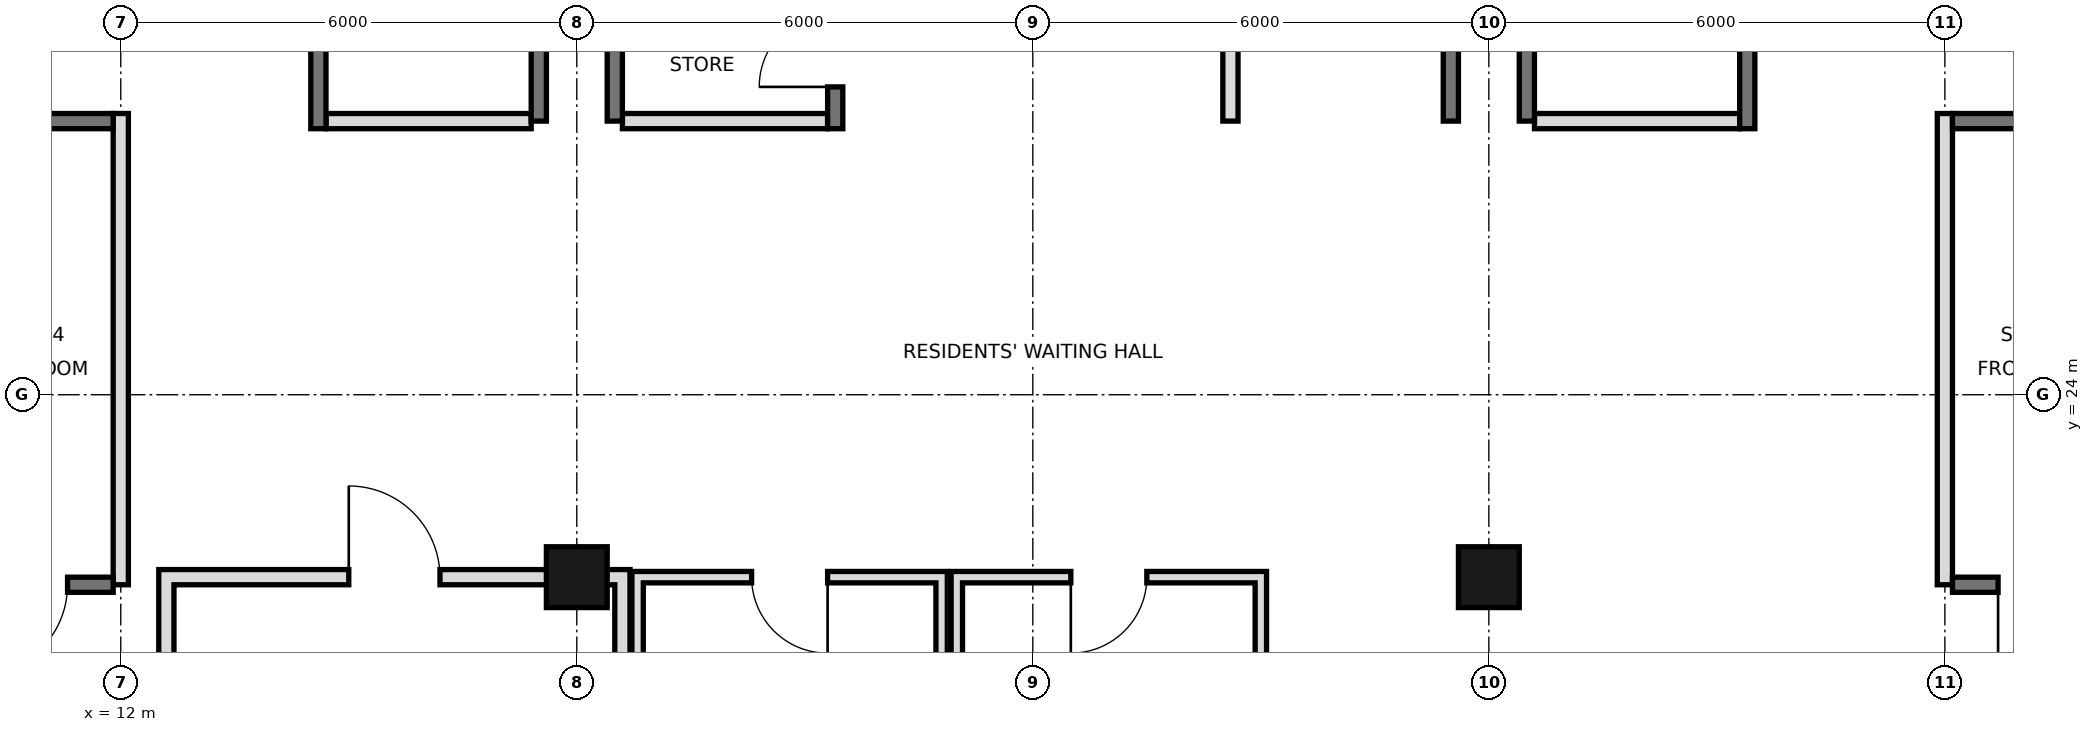
"""IFC4 building model, lengths in metres.
Left out: names, types, materials, properties, quantities, classifications, styles, units other than length and angle.
Written with IfcOpenShell. Run it as: python <this file> out.ifc"""

import sys

from ifc_helpers import new_model, si_unit, direction, frame, frame_2d, origin, origin_2d, place, context, subcontext, project, spatial, rectangle, hollow_rectangle, extrude, element, fill, save


model = new_model("IFC4")
c1 = context("Model", 3, precision=1e-05, world=origin(), true_north=direction((0.0, 1.0)))
c2 = subcontext(c1, "Body", "Model", "MODEL_VIEW")
j1 = project(units=[si_unit("LENGTHUNIT", "METRE"), si_unit("PLANEANGLEUNIT", "RADIAN")], contexts=[c1])
p1 = place(None, origin())
s1 = spatial("IfcSite", under=j1, at=p1, CompositionType="ELEMENT")
p2 = place(p1, origin())
s2 = spatial("IfcBuilding", under=s1, at=p2, CompositionType="ELEMENT")
p3 = place(p2, frame((0.0, 0.0, 341.8)))
s3 = spatial("IfcBuildingStorey", under=s2, at=p3, CompositionType="ELEMENT", Elevation=341.8)
for number, where, z_axis, x_axis in (
    (1, (18.0, 21.6, 0.0), (0.0, 0.0, 1.0), (1.0, 0.0, 0.0)),
    (2, (30.0, 21.6, 0.0), (0.0, 0.0, 1.0), (1.0, 0.0, 0.0)),
):
    element("IfcColumn", number, at=place(p3, frame(where, z_axis=z_axis, x_axis=x_axis)), inside=s3, PredefinedType="COLUMN", context=c2, shape_type="SweptSolid", body=[
        extrude(hollow_rectangle(XDim=0.8, YDim=0.8, WallThickness=0.025, at=origin_2d()), origin(), (0.0, 0.0, 1.0), 4.0),
    ])
for number, where, z_axis, x_axis in (
    (3, (12.6, 17.5, 0.0), (0.0, 0.0, 1.0), (0.0, 1.0, 0.0)),
    (4, (18.6, 17.5, 0.0), (0.0, 0.0, 1.0), (0.0, 1.0, 0.0)),
):
    element("IfcWall", number, at=place(p3, frame(where, z_axis=z_axis, x_axis=x_axis)), inside=s3, PredefinedType="SOLIDWALL", context=c2, shape_type="SweptSolid", body=[
        extrude(rectangle(XDim=4.2, YDim=0.2, at=frame_2d((2.1, 0.0))), origin(), (0.0, 0.0, 1.0), 3.05),
    ])
for number, where, z_axis, x_axis in (
    (5, (18.8, 17.525, 0.0), (0.0, 0.0, 1.0), (0.0, 1.0, 0.0)),
    (6, (22.8, 17.525, 0.0), (0.0, 0.0, 1.0), (0.0, 1.0, 0.0)),
    (7, (23.0, 17.525, 0.0), (0.0, 0.0, 1.0), (0.0, 1.0, 0.0)),
    (8, (27.0, 17.525, 0.0), (0.0, 0.0, 1.0), (0.0, 1.0, 0.0)),
):
    element("IfcWall", number, at=place(p3, frame(where, z_axis=z_axis, x_axis=x_axis)), inside=s3, PredefinedType="PARTITIONING", context=c2, shape_type="SweptSolid", body=[
        extrude(rectangle(XDim=4.15, YDim=0.15, at=frame_2d((2.075, 0.0))), origin(), (0.0, 0.0, 1.0), 3.75),
    ])
p4 = place(p3, frame((12.7, 21.6, 0.0), z_axis=(0.0, 0.0, 1.0), x_axis=(1.0, 0.0, 0.0)))
e9 = element("IfcWall", 9, at=p4, inside=s3, PredefinedType="SOLIDWALL", context=c2, shape_type="SweptSolid", body=[
    extrude(rectangle(XDim=5.8, YDim=0.2, at=frame_2d((2.9, 0.0))), origin(), (0.0, 0.0, 1.0), 3.75),
])
p5 = place(p4, frame((2.3, 0.0, 0.0)))
e10 = element("IfcOpeningElement", 10, at=p5, cuts=e9, PredefinedType="OPENING", context=c2, shape_type="SweptSolid", body=[
    extrude(rectangle(XDim=1.2, YDim=2.4, at=frame_2d((0.6, 1.2))), frame((0.0, 0.11, 0.0), z_axis=(0.0, -1.0, 0.0), x_axis=(1.0, 0.0, 0.0)), (0.0, 0.0, 1.0), 0.22),
])
p6 = place(p3, frame((18.875, 21.6, 0.0), z_axis=(0.0, 0.0, 1.0), x_axis=(1.0, 0.0, 0.0)))
e11 = element("IfcWall", 11, at=p6, inside=s3, PredefinedType="PARTITIONING", context=c2, shape_type="SweptSolid", body=[
    extrude(rectangle(XDim=3.85, YDim=0.15, at=frame_2d((1.925, 0.0))), origin(), (0.0, 0.0, 1.0), 3.75),
])
p7 = place(p6, frame((1.425, 0.0, 0.0)))
e12 = element("IfcOpeningElement", 12, at=p7, cuts=e11, PredefinedType="OPENING", context=c2, shape_type="SweptSolid", body=[
    extrude(rectangle(XDim=1.0, YDim=2.4, at=frame_2d((0.5, 1.2))), frame((0.0, 0.085, 0.0), z_axis=(0.0, -1.0, 0.0), x_axis=(1.0, 0.0, 0.0)), (0.0, 0.0, 1.0), 0.17),
])
p8 = place(p3, frame((23.075, 21.6, 0.0), z_axis=(0.0, 0.0, 1.0), x_axis=(1.0, 0.0, 0.0)))
e13 = element("IfcWall", 13, at=p8, inside=s3, PredefinedType="PARTITIONING", context=c2, shape_type="SweptSolid", body=[
    extrude(rectangle(XDim=3.85, YDim=0.15, at=frame_2d((1.925, 0.0))), origin(), (0.0, 0.0, 1.0), 3.75),
])
p9 = place(p8, frame((1.425, 0.0, 0.0)))
e14 = element("IfcOpeningElement", 14, at=p9, cuts=e13, PredefinedType="OPENING", context=c2, shape_type="SweptSolid", body=[
    extrude(rectangle(XDim=1.0, YDim=2.4, at=frame_2d((0.5, 1.2))), frame((0.0, 0.085, 0.0), z_axis=(0.0, -1.0, 0.0), x_axis=(1.0, 0.0, 0.0)), (0.0, 0.0, 1.0), 0.17),
])
for number, where, z_axis, x_axis in (
    (15, (17.5, 27.6, 0.0), (0.0, 0.0, 1.0), (0.0, 1.0, 0.0)),
    (16, (18.5, 27.6, 0.0), (0.0, 0.0, 1.0), (0.0, 1.0, 0.0)),
    (17, (29.5, 27.6, 0.0), (0.0, 0.0, 1.0), (0.0, 1.0, 0.0)),
    (18, (30.5, 27.6, 0.0), (0.0, 0.0, 1.0), (0.0, 1.0, 0.0)),
):
    element("IfcWall", number, at=place(p3, frame(where, z_axis=z_axis, x_axis=x_axis)), inside=s3, PredefinedType="SOLIDWALL", context=c2, shape_type="SweptSolid", body=[
        extrude(rectangle(XDim=17.5, YDim=0.2, at=frame_2d((8.75, 0.0))), origin(), (0.0, 0.0, 1.0), 3.75),
    ])
p10 = place(p3, frame((12.0, 21.5, 0.0), z_axis=(0.0, 0.0, 1.0), x_axis=(0.0, 1.0, 0.0)))
e19 = element("IfcWall", 19, at=p10, inside=s3, PredefinedType="PARTITIONING", context=c2, shape_type="SweptSolid", body=[
    extrude(rectangle(XDim=6.2, YDim=0.2, at=frame_2d((3.1, 0.0))), origin(), (0.0, 0.0, 1.0), 3.75),
])
p11 = place(p3, frame((14.6, 27.5, 0.0), z_axis=(0.0, 0.0, 1.0), x_axis=(0.0, 1.0, 0.0)))
e20 = element("IfcWall", 20, at=p11, inside=s3, PredefinedType="SOLIDWALL", context=c2, shape_type="SweptSolid", body=[
    extrude(rectangle(XDim=17.5, YDim=0.2, at=frame_2d((8.75, 0.0))), origin(), (0.0, 0.0, 1.0), 3.75),
])
p12 = place(p11, frame((15.4, 0.0, 0.0)))
e21 = element("IfcOpeningElement", 21, at=p12, cuts=e20, PredefinedType="OPENING", context=c2, shape_type="SweptSolid", body=[
    extrude(rectangle(XDim=1.1, YDim=2.1, at=frame_2d((0.55, 1.05))), frame((0.0, 0.11, 0.0), z_axis=(0.0, -1.0, 0.0), x_axis=(1.0, 0.0, 0.0)), (0.0, 0.0, 1.0), 0.22),
])
p13 = place(p11, frame((2.7, 0.0, 0.0)))
e22 = element("IfcOpeningElement", 22, at=p13, cuts=e20, PredefinedType="OPENING", context=c2, shape_type="SweptSolid", body=[
    extrude(rectangle(XDim=1.0, YDim=2.1, at=frame_2d((0.5, 1.05))), frame((0.0, 0.11, 0.0), z_axis=(0.0, -1.0, 0.0), x_axis=(1.0, 0.0, 0.0)), (0.0, 0.0, 1.0), 0.22),
])
p14 = place(p3, frame((21.4, 27.5, 0.0), z_axis=(0.0, 0.0, 1.0), x_axis=(0.0, 1.0, 0.0)))
e23 = element("IfcWall", 23, at=p14, inside=s3, PredefinedType="SOLIDWALL", context=c2, shape_type="SweptSolid", body=[
    extrude(rectangle(XDim=17.5, YDim=0.2, at=frame_2d((8.75, 0.0))), origin(), (0.0, 0.0, 1.0), 3.75),
])
p15 = place(p14, frame((0.55, 0.0, 0.0)))
e24 = element("IfcOpeningElement", 24, at=p15, cuts=e23, PredefinedType="OPENING", context=c2, shape_type="SweptSolid", body=[
    extrude(rectangle(XDim=1.0, YDim=2.1, at=frame_2d((0.5, 1.05))), frame((0.0, 0.11, 0.0), z_axis=(0.0, -1.0, 0.0), x_axis=(1.0, 0.0, 0.0)), (0.0, 0.0, 1.0), 0.22),
])
p16 = place(p14, frame((3.65, 0.0, 0.0)))
e25 = element("IfcOpeningElement", 25, at=p16, cuts=e23, PredefinedType="OPENING", context=c2, shape_type="SweptSolid", body=[
    extrude(rectangle(XDim=1.0, YDim=2.1, at=frame_2d((0.5, 1.05))), frame((0.0, 0.11, 0.0), z_axis=(0.0, -1.0, 0.0), x_axis=(1.0, 0.0, 0.0)), (0.0, 0.0, 1.0), 0.22),
])
p17 = place(p14, frame((9.8, 0.0, 0.0)))
e26 = element("IfcOpeningElement", 26, at=p17, cuts=e23, PredefinedType="OPENING", context=c2, shape_type="SweptSolid", body=[
    extrude(rectangle(XDim=1.0, YDim=2.1, at=frame_2d((0.5, 1.05))), frame((0.0, 0.11, 0.0), z_axis=(0.0, -1.0, 0.0), x_axis=(1.0, 0.0, 0.0)), (0.0, 0.0, 1.0), 0.22),
])
p18 = place(p3, frame((26.6, 27.6, 0.0), z_axis=(0.0, 0.0, 1.0), x_axis=(0.0, 1.0, 0.0)))
e27 = element("IfcWall", 27, at=p18, inside=s3, PredefinedType="PARTITIONING", context=c2, shape_type="SweptSolid", body=[
    extrude(rectangle(XDim=17.4, YDim=0.2, at=frame_2d((8.7, 0.0))), origin(), (0.0, 0.0, 1.0), 3.75),
])
p19 = place(p18, frame((10.25, 0.0, 0.0)))
e28 = element("IfcOpeningElement", 28, at=p19, cuts=e27, PredefinedType="OPENING", context=c2, shape_type="SweptSolid", body=[
    extrude(rectangle(XDim=1.0, YDim=2.1, at=frame_2d((0.5, 1.05))), frame((0.0, 0.11, 0.0), z_axis=(0.0, -1.0, 0.0), x_axis=(1.0, 0.0, 0.0)), (0.0, 0.0, 1.0), 0.22),
])
p20 = place(p18, frame((14.475, 0.0, 0.0)))
e29 = element("IfcOpeningElement", 29, at=p20, cuts=e27, PredefinedType="OPENING", context=c2, shape_type="SweptSolid", body=[
    extrude(rectangle(XDim=1.0, YDim=2.1, at=frame_2d((0.5, 1.05))), frame((0.0, 0.11, 0.0), z_axis=(0.0, -1.0, 0.0), x_axis=(1.0, 0.0, 0.0)), (0.0, 0.0, 1.0), 0.22),
])
p21 = place(p3, frame((33.4, 27.5, 0.0), z_axis=(0.0, 0.0, 1.0), x_axis=(0.0, 1.0, 0.0)))
e30 = element("IfcWall", 30, at=p21, inside=s3, PredefinedType="SOLIDWALL", context=c2, shape_type="SweptSolid", body=[
    extrude(rectangle(XDim=17.5, YDim=0.2, at=frame_2d((8.75, 0.0))), origin(), (0.0, 0.0, 1.0), 3.75),
])
p22 = place(p21, frame((15.4, 0.0, 0.0)))
e31 = element("IfcOpeningElement", 31, at=p22, cuts=e30, PredefinedType="OPENING", context=c2, shape_type="SweptSolid", body=[
    extrude(rectangle(XDim=1.1, YDim=2.1, at=frame_2d((0.55, 1.05))), frame((0.0, 0.11, 0.0), z_axis=(0.0, -1.0, 0.0), x_axis=(1.0, 0.0, 0.0)), (0.0, 0.0, 1.0), 0.22),
])
p23 = place(p21, frame((2.7, 0.0, 0.0)))
e32 = element("IfcOpeningElement", 32, at=p23, cuts=e30, PredefinedType="OPENING", context=c2, shape_type="SweptSolid", body=[
    extrude(rectangle(XDim=1.0, YDim=2.1, at=frame_2d((0.5, 1.05))), frame((0.0, 0.11, 0.0), z_axis=(0.0, -1.0, 0.0), x_axis=(1.0, 0.0, 0.0)), (0.0, 0.0, 1.0), 0.22),
])
p24 = place(p3, frame((36.0, 21.5, 0.0), z_axis=(0.0, 0.0, 1.0), x_axis=(0.0, 1.0, 0.0)))
e33 = element("IfcWall", 33, at=p24, inside=s3, PredefinedType="PARTITIONING", context=c2, shape_type="SweptSolid", body=[
    extrude(rectangle(XDim=6.2, YDim=0.2, at=frame_2d((3.1, 0.0))), origin(), (0.0, 0.0, 1.0), 3.75),
])
p25 = place(p3, frame((36.1, 21.5, 0.0), z_axis=(0.0, 0.0, 1.0), x_axis=(1.0, 0.0, 0.0)))
e34 = element("IfcWall", 34, at=p25, inside=s3, PredefinedType="SOLIDWALL", context=c2, shape_type="SweptSolid", body=[
    extrude(rectangle(XDim=5.3, YDim=0.2, at=frame_2d((2.65, 0.0))), origin(), (0.0, 0.0, 1.0), 3.75),
])
p26 = place(p25, frame((0.6, 0.0, 0.0)))
e35 = element("IfcOpeningElement", 35, at=p26, cuts=e34, PredefinedType="OPENING", context=c2, shape_type="SweptSolid", body=[
    extrude(rectangle(XDim=1.2, YDim=2.1, at=frame_2d((0.6, 1.05))), frame((0.0, 0.11, 0.0), z_axis=(0.0, -1.0, 0.0), x_axis=(1.0, 0.0, 0.0)), (0.0, 0.0, 1.0), 0.22),
])
p27 = place(p3, frame((6.6, 21.5, 0.0), z_axis=(0.0, 0.0, 1.0), x_axis=(1.0, 0.0, 0.0)))
e36 = element("IfcWall", 36, at=p27, inside=s3, PredefinedType="SOLIDWALL", context=c2, shape_type="SweptSolid", body=[
    extrude(rectangle(XDim=5.3, YDim=0.2, at=frame_2d((2.65, 0.0))), origin(), (0.0, 0.0, 1.0), 3.75),
])
p28 = place(p27, frame((3.5, 0.0, 0.0)))
e37 = element("IfcOpeningElement", 37, at=p28, cuts=e36, PredefinedType="OPENING", context=c2, shape_type="SweptSolid", body=[
    extrude(rectangle(XDim=1.2, YDim=2.1, at=frame_2d((0.6, 1.05))), frame((0.0, 0.11, 0.0), z_axis=(0.0, -1.0, 0.0), x_axis=(1.0, 0.0, 0.0)), (0.0, 0.0, 1.0), 0.22),
])
for number, where, z_axis, x_axis in (
    (38, (14.7, 27.6, 0.0), (0.0, 0.0, 1.0), (1.0, 0.0, 0.0)),
    (39, (18.6, 27.6, 0.0), (0.0, 0.0, 1.0), (1.0, 0.0, 0.0)),
    (40, (30.6, 27.6, 0.0), (0.0, 0.0, 1.0), (1.0, 0.0, 0.0)),
):
    element("IfcWall", number, at=place(p3, frame(where, z_axis=z_axis, x_axis=x_axis)), inside=s3, PredefinedType="PARTITIONING", context=c2, shape_type="SweptSolid", body=[
        extrude(rectangle(XDim=2.7, YDim=0.2, at=frame_2d((1.35, 0.0))), origin(), (0.0, 0.0, 1.0), 3.75),
    ])
for number, where, z_axis, x_axis in (
    (41, (36.1, 27.6, 0.0), (0.0, 0.0, 1.0), (1.0, 0.0, 0.0)),
    (42, (6.6, 27.6, 0.0), (0.0, 0.0, 1.0), (1.0, 0.0, 0.0)),
):
    element("IfcWall", number, at=place(p3, frame(where, z_axis=z_axis, x_axis=x_axis)), inside=s3, PredefinedType="SOLIDWALL", context=c2, shape_type="SweptSolid", body=[
        extrude(rectangle(XDim=5.3, YDim=0.2, at=frame_2d((2.65, 0.0))), origin(), (0.0, 0.0, 1.0), 3.75),
    ])
p29 = place(p5, origin())
e43 = element("IfcDoor", 43, at=p29, inside=s3, OperationType="SINGLE_SWING_LEFT", PredefinedType="DOOR", context=c2, shape_type="SweptSolid", body=[
    extrude(rectangle(XDim=1.2, YDim=2.4, at=frame_2d((0.6, 1.2))), frame((0.0, 0.025, 0.0), z_axis=(0.0, -1.0, 0.0), x_axis=(1.0, 0.0, 0.0)), (0.0, 0.0, 1.0), 0.05),
])
fill(e10, e43)
p30 = place(p7, origin())
e44 = element("IfcDoor", 44, at=p30, inside=s3, OperationType="SINGLE_SWING_RIGHT", PredefinedType="DOOR", context=c2, shape_type="SweptSolid", body=[
    extrude(rectangle(XDim=1.0, YDim=2.4, at=frame_2d((0.5, 1.2))), frame((0.0, 0.025, 0.0), z_axis=(0.0, -1.0, 0.0), x_axis=(1.0, 0.0, 0.0)), (0.0, 0.0, 1.0), 0.05),
])
fill(e12, e44)
p31 = place(p9, frame((1.0, 0.0, 0.0), z_axis=(0.0, 0.0, 1.0), x_axis=(-1.0, 0.0, 0.0)))
e45 = element("IfcDoor", 45, at=p31, inside=s3, OperationType="SINGLE_SWING_RIGHT", PredefinedType="DOOR", context=c2, shape_type="SweptSolid", body=[
    extrude(rectangle(XDim=1.0, YDim=2.4, at=frame_2d((0.5, 1.2))), frame((0.0, 0.025, 0.0), z_axis=(0.0, -1.0, 0.0), x_axis=(1.0, 0.0, 0.0)), (0.0, 0.0, 1.0), 0.05),
])
fill(e14, e45)
p32 = place(p28, frame((1.2, 0.0, 0.0), z_axis=(0.0, 0.0, 1.0), x_axis=(-1.0, 0.0, 0.0)))
e46 = element("IfcDoor", 46, at=p32, inside=s3, OperationType="SINGLE_SWING_RIGHT", PredefinedType="DOOR", context=c2, shape_type="SweptSolid", body=[
    extrude(rectangle(XDim=1.2, YDim=2.1, at=frame_2d((0.6, 1.05))), frame((0.0, 0.025, 0.0), z_axis=(0.0, -1.0, 0.0), x_axis=(1.0, 0.0, 0.0)), (0.0, 0.0, 1.0), 0.05),
])
fill(e37, e46)
p33 = place(p26, frame((1.2, 0.0, 0.0), z_axis=(0.0, 0.0, 1.0), x_axis=(-1.0, 0.0, 0.0)))
e47 = element("IfcDoor", 47, at=p33, inside=s3, OperationType="SINGLE_SWING_RIGHT", PredefinedType="DOOR", context=c2, shape_type="SweptSolid", body=[
    extrude(rectangle(XDim=1.2, YDim=2.1, at=frame_2d((0.6, 1.05))), frame((0.0, 0.025, 0.0), z_axis=(0.0, -1.0, 0.0), x_axis=(1.0, 0.0, 0.0)), (0.0, 0.0, 1.0), 0.05),
])
fill(e35, e47)
p34 = place(p15, origin())
e48 = element("IfcDoor", 48, at=p34, inside=s3, OperationType="SINGLE_SWING_LEFT", PredefinedType="DOOR", context=c2, shape_type="SweptSolid", body=[
    extrude(rectangle(XDim=1.0, YDim=2.1, at=frame_2d((0.5, 1.05))), frame((0.0, 0.025, 0.0), z_axis=(0.0, -1.0, 0.0), x_axis=(1.0, 0.0, 0.0)), (0.0, 0.0, 1.0), 0.05),
])
fill(e24, e48)
save(model, sys.argv[1])
